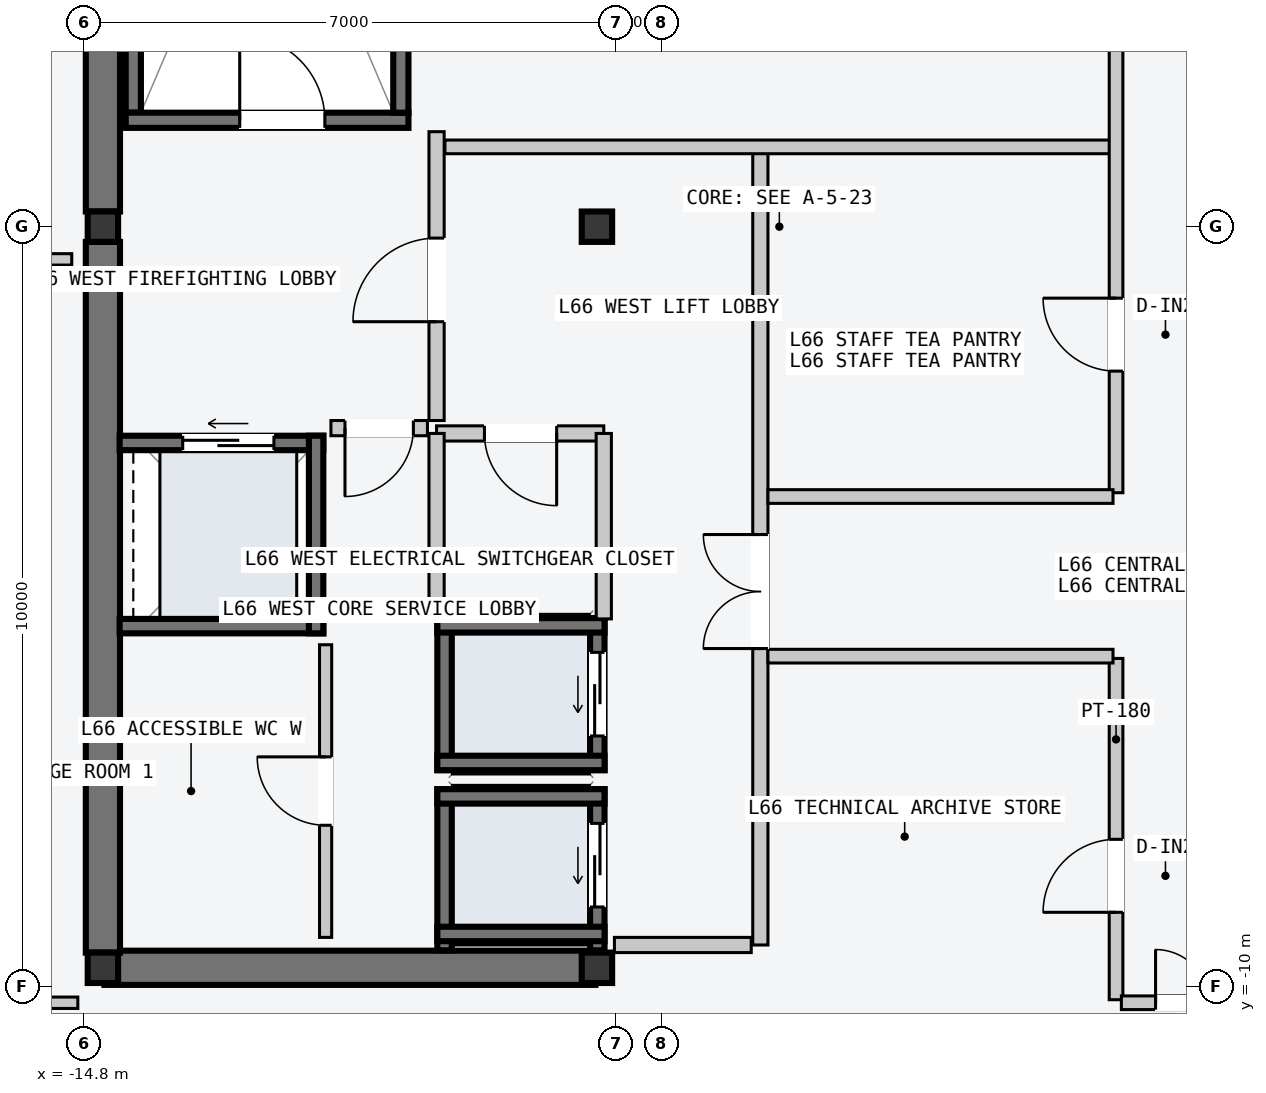
"""IFC4 building model, lengths in metres.
Left out: names, types, materials, properties, quantities, classifications, styles, units other than length and angle.
Written with IfcOpenShell. Run it as: python <this file> out.ifc"""

import sys

from ifc_helpers import new_model, si_unit, direction, frame, frame_2d, origin, origin_2d, place, context, subcontext, project, spatial, rectangle, i_section, extrude, element, fill, save


model = new_model("IFC4")
c1 = context("Model", 3, precision=1e-05, world=origin(), true_north=direction((0.0, 1.0)))
c2 = subcontext(c1, "Body", "Model", "MODEL_VIEW")
j1 = project(units=[si_unit("LENGTHUNIT", "METRE"), si_unit("PLANEANGLEUNIT", "RADIAN")], contexts=[c1])
p1 = place(None, origin())
s1 = spatial("IfcSite", under=j1, at=p1, CompositionType="ELEMENT")
p2 = place(p1, origin())
s2 = spatial("IfcBuilding", under=s1, at=p2, CompositionType="ELEMENT")
p3 = place(p2, frame((0.0, 0.0, 250.8)))
s3 = spatial("IfcBuildingStorey", under=s2, at=p3, CompositionType="ELEMENT", Elevation=250.8)
p4 = place(p3, frame((-14.53, -9.75, -0.2), z_axis=(0.0, 0.0, 1.0), x_axis=(1.0, 0.0, 0.0)))
e1 = element("IfcWall", 1, at=p4, inside=s3, PredefinedType="SHEAR", context=c2, shape_type="SweptSolid", body=[
    extrude(rectangle(XDim=6.46, YDim=0.45, at=frame_2d((3.23, 0.0))), origin(), (0.0, 0.0, 1.0), 3.6),
])
for number, where, z_axis, x_axis in (
    (2, (-14.55, -9.55, -0.2), (0.0, 0.0, 1.0), (0.0, 1.0, 0.0)),
    (3, (-14.55, 0.2, -0.2), (0.0, 0.0, 1.0), (0.0, 1.0, 0.0)),
):
    element("IfcWall", number, at=place(p3, frame(where, z_axis=z_axis, x_axis=x_axis)), inside=s3, PredefinedType="SHEAR", context=c2, shape_type="SweptSolid", body=[
        extrude(rectangle(XDim=9.35, YDim=0.45, at=frame_2d((4.675, 0.0))), origin(), (0.0, 0.0, 1.0), 3.6),
    ])
p5 = place(p3, frame((-14.15, 1.5, -0.2), z_axis=(0.0, 0.0, 1.0), x_axis=(0.0, 1.0, 0.0)))
e4 = element("IfcWall", 4, at=p5, inside=s3, PredefinedType="SOLIDWALL", context=c2, shape_type="SweptSolid", body=[
    extrude(rectangle(XDim=7.8, YDim=0.2, at=frame_2d((3.9, 0.0))), origin(), (0.0, 0.0, 1.0), 3.6),
])
p6 = place(p3, frame((-14.25, 1.4, -0.2), z_axis=(0.0, 0.0, 1.0), x_axis=(1.0, 0.0, 0.0)))
e5 = element("IfcWall", 5, at=p6, inside=s3, PredefinedType="SOLIDWALL", context=c2, shape_type="SweptSolid", body=[
    extrude(rectangle(XDim=3.72, YDim=0.2, at=frame_2d((1.86, 0.0))), origin(), (0.0, 0.0, 1.0), 3.6),
])
p7 = place(p6, frame((1.5, 0.0, 0.2)))
e6 = element("IfcOpeningElement", 6, at=p7, cuts=e5, PredefinedType="OPENING", context=c2, shape_type="SweptSolid", body=[
    extrude(rectangle(XDim=1.12, YDim=2.18, at=frame_2d((0.56, 1.09))), frame((0.0, 0.11, 0.0), z_axis=(0.0, -1.0, 0.0), x_axis=(1.0, 0.0, 0.0)), (0.0, 0.0, 1.0), 0.22),
])
p8 = place(p3, frame((-10.63, 1.5, -0.2), z_axis=(0.0, 0.0, 1.0), x_axis=(0.0, 1.0, 0.0)))
e7 = element("IfcWall", 7, at=p8, inside=s3, PredefinedType="SOLIDWALL", context=c2, shape_type="SweptSolid", body=[
    extrude(rectangle(XDim=7.8, YDim=0.2, at=frame_2d((3.9, 0.0))), origin(), (0.0, 0.0, 1.0), 3.6),
])
for number, where, z_axis, x_axis in (
    (8, (-14.55, -9.75, 0.0), (0.0, 0.0, 1.0), (1.0, 0.0, 0.0)),
    (9, (-14.55, 0.0, 0.0), (0.0, 0.0, 1.0), (1.0, 0.0, 0.0)),
    (10, (-8.05, -9.75, 0.0), (0.0, 0.0, 1.0), (1.0, 0.0, 0.0)),
    (11, (-8.05, 0.0, 0.0), (0.0, 0.0, 1.0), (1.0, 0.0, 0.0)),
):
    element("IfcColumn", number, at=place(p3, frame(where, z_axis=z_axis, x_axis=x_axis)), inside=s3, PredefinedType="COLUMN", context=c2, shape_type="SweptSolid", body=[
        extrude(i_section(OverallWidth=0.4, OverallDepth=0.4, WebThickness=0.013, FlangeThickness=0.021, at=origin_2d()), origin(), (0.0, 0.0, 1.0), 3.6),
    ])
p9 = place(p3, frame((-8.045, -9.52, -0.2), z_axis=(0.0, 0.0, 1.0), x_axis=(0.0, 1.0, 0.0)))
e12 = element("IfcWall", 12, at=p9, inside=s3, PredefinedType="SOLIDWALL", context=c2, shape_type="SweptSolid", body=[
    extrude(rectangle(XDim=2.12, YDim=0.19, at=frame_2d((1.06, 0.0))), origin(), (0.0, 0.0, 1.0), 3.6),
])
p10 = place(p9, frame((0.57, 0.0, 0.2)))
e13 = element("IfcOpeningElement", 13, at=p10, cuts=e12, PredefinedType="OPENING", context=c2, shape_type="SweptSolid", body=[
    extrude(rectangle(XDim=1.1, YDim=2.2, at=frame_2d((0.55, 1.1))), frame((0.0, 0.105, 0.0), z_axis=(0.0, -1.0, 0.0), x_axis=(1.0, 0.0, 0.0)), (0.0, 0.0, 1.0), 0.21),
])
p11 = place(p3, frame((-10.055, -9.52, -0.2), z_axis=(0.0, 0.0, 1.0), x_axis=(0.0, 1.0, 0.0)))
e14 = element("IfcWall", 14, at=p11, inside=s3, PredefinedType="SOLIDWALL", context=c2, shape_type="SweptSolid", body=[
    extrude(rectangle(XDim=2.12, YDim=0.19, at=frame_2d((1.06, 0.0))), origin(), (0.0, 0.0, 1.0), 3.6),
])
for number, where, z_axis, x_axis in (
    (15, (-10.15, -7.495, -0.2), (0.0, 0.0, 1.0), (1.0, 0.0, 0.0)),
    (16, (-10.15, -9.305, -0.2), (0.0, 0.0, 1.0), (1.0, 0.0, 0.0)),
):
    element("IfcWall", number, at=place(p3, frame(where, z_axis=z_axis, x_axis=x_axis)), inside=s3, PredefinedType="SOLIDWALL", context=c2, shape_type="SweptSolid", body=[
        extrude(rectangle(XDim=2.2, YDim=0.19, at=frame_2d((1.1, 0.0))), origin(), (0.0, 0.0, 1.0), 3.6),
    ])
p12 = place(p3, frame((-8.045, -7.15, -0.2), z_axis=(0.0, 0.0, 1.0), x_axis=(0.0, 1.0, 0.0)))
e17 = element("IfcWall", 17, at=p12, inside=s3, PredefinedType="SOLIDWALL", context=c2, shape_type="SweptSolid", body=[
    extrude(rectangle(XDim=2.0, YDim=0.19, at=frame_2d((1.0, 0.0))), origin(), (0.0, 0.0, 1.0), 3.6),
])
p13 = place(p12, frame((0.45, 0.0, 0.2)))
e18 = element("IfcOpeningElement", 18, at=p13, cuts=e17, PredefinedType="OPENING", context=c2, shape_type="SweptSolid", body=[
    extrude(rectangle(XDim=1.1, YDim=2.2, at=frame_2d((0.55, 1.1))), frame((0.0, 0.105, 0.0), z_axis=(0.0, -1.0, 0.0), x_axis=(1.0, 0.0, 0.0)), (0.0, 0.0, 1.0), 0.21),
])
p14 = place(p3, frame((-10.055, -7.15, -0.2), z_axis=(0.0, 0.0, 1.0), x_axis=(0.0, 1.0, 0.0)))
e19 = element("IfcWall", 19, at=p14, inside=s3, PredefinedType="SOLIDWALL", context=c2, shape_type="SweptSolid", body=[
    extrude(rectangle(XDim=2.0, YDim=0.19, at=frame_2d((1.0, 0.0))), origin(), (0.0, 0.0, 1.0), 3.6),
])
for number, where, z_axis, x_axis in (
    (20, (-10.15, -5.245, -0.2), (0.0, 0.0, 1.0), (1.0, 0.0, 0.0)),
    (21, (-10.15, -7.055, -0.2), (0.0, 0.0, 1.0), (1.0, 0.0, 0.0)),
):
    element("IfcWall", number, at=place(p3, frame(where, z_axis=z_axis, x_axis=x_axis)), inside=s3, PredefinedType="SOLIDWALL", context=c2, shape_type="SweptSolid", body=[
        extrude(rectangle(XDim=2.2, YDim=0.19, at=frame_2d((1.1, 0.0))), origin(), (0.0, 0.0, 1.0), 3.6),
    ])
p15 = place(p3, frame((-14.33, -2.845, -0.2), z_axis=(0.0, 0.0, 1.0), x_axis=(1.0, 0.0, 0.0)))
e22 = element("IfcWall", 22, at=p15, inside=s3, PredefinedType="SOLIDWALL", context=c2, shape_type="SweptSolid", body=[
    extrude(rectangle(XDim=2.68, YDim=0.19, at=frame_2d((1.34, 0.0))), origin(), (0.0, 0.0, 1.0), 3.6),
])
p16 = place(p15, frame((0.83, 0.0, 0.2)))
e23 = element("IfcOpeningElement", 23, at=p16, cuts=e22, PredefinedType="OPENING", context=c2, shape_type="SweptSolid", body=[
    extrude(rectangle(XDim=1.2, YDim=2.2, at=frame_2d((0.6, 1.1))), frame((0.0, 0.105, 0.0), z_axis=(0.0, -1.0, 0.0), x_axis=(1.0, 0.0, 0.0)), (0.0, 0.0, 1.0), 0.21),
])
p17 = place(p3, frame((-14.33, -5.255, -0.2), z_axis=(0.0, 0.0, 1.0), x_axis=(1.0, 0.0, 0.0)))
e24 = element("IfcWall", 24, at=p17, inside=s3, PredefinedType="SOLIDWALL", context=c2, shape_type="SweptSolid", body=[
    extrude(rectangle(XDim=2.68, YDim=0.19, at=frame_2d((1.34, 0.0))), origin(), (0.0, 0.0, 1.0), 3.6),
])
p18 = place(p3, frame((-11.745, -5.35, -0.2), z_axis=(0.0, 0.0, 1.0), x_axis=(0.0, 1.0, 0.0)))
e25 = element("IfcWall", 25, at=p18, inside=s3, PredefinedType="SOLIDWALL", context=c2, shape_type="SweptSolid", body=[
    extrude(rectangle(XDim=2.6, YDim=0.19, at=frame_2d((1.3, 0.0))), origin(), (0.0, 0.0, 1.0), 3.6),
])
p19 = place(p3, frame((-5.9, -9.45, 0.0), z_axis=(0.0, 0.0, 1.0), x_axis=(0.0, 1.0, 0.0)))
e26 = element("IfcWall", 26, at=p19, inside=s3, PredefinedType="PARTITIONING", context=c2, shape_type="SweptSolid", body=[
    extrude(rectangle(XDim=10.5, YDim=0.2, at=frame_2d((5.25, 0.0))), origin(), (0.0, 0.0, 1.0), 3.4),
])
p20 = place(p19, frame((3.9, 0.0, 0.0)))
e27 = element("IfcOpeningElement", 27, at=p20, cuts=e26, PredefinedType="OPENING", context=c2, shape_type="SweptSolid", body=[
    extrude(rectangle(XDim=1.5, YDim=2.2, at=frame_2d((0.75, 1.1))), frame((0.0, 0.11, 0.0), z_axis=(0.0, -1.0, 0.0), x_axis=(1.0, 0.0, 0.0)), (0.0, 0.0, 1.0), 0.22),
])
p21 = place(p3, frame((-6.02, -9.45, 0.0), z_axis=(0.0, 0.0, 1.0), x_axis=(-1.0, 0.0, 0.0)))
e28 = element("IfcWall", 28, at=p21, inside=s3, PredefinedType="PARTITIONING", context=c2, shape_type="SweptSolid", body=[
    extrude(rectangle(XDim=1.8, YDim=0.2, at=frame_2d((0.9, 0.0))), origin(), (0.0, 0.0, 1.0), 3.4),
])
p22 = place(p3, frame((-10.16, -2.55, 0.0), z_axis=(0.0, 0.0, 1.0), x_axis=(0.0, 1.0, 0.0)))
e29 = element("IfcWall", 29, at=p22, inside=s3, PredefinedType="PARTITIONING", context=c2, shape_type="SweptSolid", body=[
    extrude(rectangle(XDim=3.8, YDim=0.2, at=frame_2d((1.9, 0.0))), origin(), (0.0, 0.0, 1.0), 3.4),
])
p23 = place(p22, frame((1.3, 0.0, 0.0)))
e30 = element("IfcOpeningElement", 30, at=p23, cuts=e29, PredefinedType="OPENING", context=c2, shape_type="SweptSolid", body=[
    extrude(rectangle(XDim=1.1, YDim=2.15, at=frame_2d((0.55, 1.075))), frame((0.0, 0.11, 0.0), z_axis=(0.0, -1.0, 0.0), x_axis=(1.0, 0.0, 0.0)), (0.0, 0.0, 1.0), 0.22),
])
p24 = place(p3, frame((-10.28, -2.65, 0.0), z_axis=(0.0, 0.0, 1.0), x_axis=(-1.0, 0.0, 0.0)))
e31 = element("IfcWall", 31, at=p24, inside=s3, PredefinedType="PARTITIONING", context=c2, shape_type="SweptSolid", body=[
    extrude(rectangle(XDim=1.27, YDim=0.2, at=frame_2d((0.635, 0.0))), origin(), (0.0, 0.0, 1.0), 3.4),
])
p25 = place(p24, frame((0.185, 0.0, 0.0)))
e32 = element("IfcOpeningElement", 32, at=p25, cuts=e31, PredefinedType="OPENING", context=c2, shape_type="SweptSolid", body=[
    extrude(rectangle(XDim=0.9, YDim=2.15, at=frame_2d((0.45, 1.075))), frame((0.0, 0.11, 0.0), z_axis=(0.0, -1.0, 0.0), x_axis=(1.0, 0.0, 0.0)), (0.0, 0.0, 1.0), 0.22),
])
p26 = place(p3, frame((-7.96, -2.72, 0.0), z_axis=(0.0, 0.0, 1.0), x_axis=(-1.0, 0.0, 0.0)))
e33 = element("IfcWall", 33, at=p26, inside=s3, PredefinedType="PARTITIONING", context=c2, shape_type="SweptSolid", body=[
    extrude(rectangle(XDim=2.2, YDim=0.2, at=frame_2d((1.1, 0.0))), origin(), (0.0, 0.0, 1.0), 3.4),
])
p27 = place(p26, frame((0.62, 0.0, 0.0)))
e34 = element("IfcOpeningElement", 34, at=p27, cuts=e33, PredefinedType="OPENING", context=c2, shape_type="SweptSolid", body=[
    extrude(rectangle(XDim=0.95, YDim=2.1, at=frame_2d((0.475, 1.05))), frame((0.0, 0.11, 0.0), z_axis=(0.0, -1.0, 0.0), x_axis=(1.0, 0.0, 0.0)), (0.0, 0.0, 1.0), 0.22),
])
for number, where, z_axis, x_axis in (
    (35, (-7.96, -5.16, 0.0), (0.0, 0.0, 1.0), (0.0, 1.0, 0.0)),
    (36, (-10.16, -5.16, 0.0), (0.0, 0.0, 1.0), (0.0, 1.0, 0.0)),
):
    element("IfcWall", number, at=place(p3, frame(where, z_axis=z_axis, x_axis=x_axis)), inside=s3, PredefinedType="PARTITIONING", context=c2, shape_type="SweptSolid", body=[
        extrude(rectangle(XDim=2.44, YDim=0.2, at=frame_2d((1.22, 0.0))), origin(), (0.0, 0.0, 1.0), 3.4),
    ])
p28 = place(p3, frame((-11.62, -9.35, 0.0), z_axis=(0.0, 0.0, 1.0), x_axis=(0.0, 1.0, 0.0)))
e37 = element("IfcWall", 37, at=p28, inside=s3, PredefinedType="PARTITIONING", context=c2, shape_type="SweptSolid", body=[
    extrude(rectangle(XDim=3.85, YDim=0.16, at=frame_2d((1.925, 0.0))), origin(), (0.0, 0.0, 1.0), 3.4),
])
p29 = place(p28, frame((1.475, 0.0, 0.0)))
e38 = element("IfcOpeningElement", 38, at=p29, cuts=e37, PredefinedType="OPENING", context=c2, shape_type="SweptSolid", body=[
    extrude(rectangle(XDim=0.9, YDim=2.15, at=frame_2d((0.45, 1.075))), frame((0.0, 0.09, 0.0), z_axis=(0.0, -1.0, 0.0), x_axis=(1.0, 0.0, 0.0)), (0.0, 0.0, 1.0), 0.18),
])
p30 = place(p3, frame((-10.05, 1.05, 0.0), z_axis=(0.0, 0.0, 1.0), x_axis=(1.0, 0.0, 0.0)))
e39 = element("IfcWall", 39, at=p30, inside=s3, PredefinedType="PARTITIONING", context=c2, shape_type="SweptSolid", body=[
    extrude(rectangle(XDim=8.79, YDim=0.18, at=frame_2d((4.395, 0.0))), origin(), (0.0, 0.0, 1.0), 3.4),
])
p31 = place(p3, frame((-1.22, -3.5, 0.0), z_axis=(0.0, 0.0, 1.0), x_axis=(0.0, 1.0, 0.0)))
e40 = element("IfcWall", 40, at=p31, inside=s3, PredefinedType="PARTITIONING", context=c2, shape_type="SweptSolid", body=[
    extrude(rectangle(XDim=13.67, YDim=0.18, at=frame_2d((6.835, 0.0))), origin(), (0.0, 0.0, 1.0), 3.4),
])
p32 = place(p31, frame((6.1, 0.0, 0.0)))
e41 = element("IfcOpeningElement", 41, at=p32, cuts=e40, PredefinedType="OPENING", context=c2, shape_type="SweptSolid", body=[
    extrude(rectangle(XDim=1.24, YDim=2.24, at=frame_2d((0.62, 1.12))), frame((0.0, 0.1, 0.0), z_axis=(0.0, -1.0, 0.0), x_axis=(1.0, 0.0, 0.0)), (0.0, 0.0, 1.0), 0.2),
])
p33 = place(p31, frame((1.6, 0.0, 0.0)))
e42 = element("IfcOpeningElement", 42, at=p33, cuts=e40, PredefinedType="OPENING", context=c2, shape_type="SweptSolid", body=[
    extrude(rectangle(XDim=0.96, YDim=2.18, at=frame_2d((0.48, 1.09))), frame((0.0, 0.1, 0.0), z_axis=(0.0, -1.0, 0.0), x_axis=(1.0, 0.0, 0.0)), (0.0, 0.0, 1.0), 0.2),
])
p34 = place(p3, frame((-5.8, -3.55, 0.0), z_axis=(0.0, 0.0, 1.0), x_axis=(1.0, 0.0, 0.0)))
e43 = element("IfcWall", 43, at=p34, inside=s3, PredefinedType="PARTITIONING", context=c2, shape_type="SweptSolid", body=[
    extrude(rectangle(XDim=4.54, YDim=0.18, at=frame_2d((2.27, 0.0))), origin(), (0.0, 0.0, 1.0), 3.4),
])
p35 = place(p3, frame((-1.22, -10.17, 0.0), z_axis=(0.0, 0.0, 1.0), x_axis=(0.0, 1.0, 0.0)))
e44 = element("IfcWall", 44, at=p35, inside=s3, PredefinedType="PARTITIONING", context=c2, shape_type="SweptSolid", body=[
    extrude(rectangle(XDim=4.49, YDim=0.18, at=frame_2d((2.245, 0.0))), origin(), (0.0, 0.0, 1.0), 3.4),
])
p36 = place(p35, frame((1.15, 0.0, 0.0)))
e45 = element("IfcOpeningElement", 45, at=p36, cuts=e44, PredefinedType="OPENING", context=c2, shape_type="SweptSolid", body=[
    extrude(rectangle(XDim=0.96, YDim=2.18, at=frame_2d((0.48, 1.09))), frame((0.0, 0.1, 0.0), z_axis=(0.0, -1.0, 0.0), x_axis=(1.0, 0.0, 0.0)), (0.0, 0.0, 1.0), 0.2),
])
p37 = place(p3, frame((-5.8, -5.65, 0.0), z_axis=(0.0, 0.0, 1.0), x_axis=(1.0, 0.0, 0.0)))
e46 = element("IfcWall", 46, at=p37, inside=s3, PredefinedType="PARTITIONING", context=c2, shape_type="SweptSolid", body=[
    extrude(rectangle(XDim=4.54, YDim=0.18, at=frame_2d((2.27, 0.0))), origin(), (0.0, 0.0, 1.0), 3.4),
])
p38 = place(p3, frame((-1.15, -10.21, 0.0), z_axis=(0.0, 0.0, 1.0), x_axis=(1.0, 0.0, 0.0)))
e47 = element("IfcWall", 47, at=p38, inside=s3, PredefinedType="PARTITIONING", context=c2, shape_type="SweptSolid", body=[
    extrude(rectangle(XDim=2.3, YDim=0.18, at=frame_2d((1.15, 0.0))), origin(), (0.0, 0.0, 1.0), 3.4),
])
p39 = place(p38, frame((0.45, 0.0, 0.0)))
e48 = element("IfcOpeningElement", 48, at=p39, cuts=e47, PredefinedType="OPENING", context=c2, shape_type="SweptSolid", body=[
    extrude(rectangle(XDim=1.4, YDim=2.2, at=frame_2d((0.7, 1.1))), frame((0.0, 0.1, 0.0), z_axis=(0.0, -1.0, 0.0), x_axis=(1.0, 0.0, 0.0)), (0.0, 0.0, 1.0), 0.2),
])
p40 = place(p3, frame((-17.55, -10.21, 0.0), z_axis=(0.0, 0.0, 1.0), x_axis=(1.0, 0.0, 0.0)))
e49 = element("IfcWall", 49, at=p40, inside=s3, PredefinedType="PARTITIONING", context=c2, shape_type="SweptSolid", body=[
    extrude(rectangle(XDim=2.67, YDim=0.15, at=frame_2d((1.335, 0.0))), origin(), (0.0, 0.0, 1.0), 3.4),
])
p41 = place(p40, frame((0.855, 0.0, 0.0)))
e50 = element("IfcOpeningElement", 50, at=p41, cuts=e49, PredefinedType="OPENING", context=c2, shape_type="SweptSolid", body=[
    extrude(rectangle(XDim=0.96, YDim=2.18, at=frame_2d((0.48, 1.09))), frame((0.0, 0.085, 0.0), z_axis=(0.0, -1.0, 0.0), x_axis=(1.0, 0.0, 0.0)), (0.0, 0.0, 1.0), 0.17),
])
p42 = place(p3, frame((-18.56, -0.43, 0.0), z_axis=(0.0, 0.0, 1.0), x_axis=(1.0, 0.0, 0.0)))
e51 = element("IfcWall", 51, at=p42, inside=s3, PredefinedType="PARTITIONING", context=c2, shape_type="SweptSolid", body=[
    extrude(rectangle(XDim=3.6, YDim=0.15, at=frame_2d((1.8, 0.0))), origin(), (0.0, 0.0, 1.0), 3.4),
])
p43 = place(p42, frame((0.9, 0.0, 0.0)))
e52 = element("IfcOpeningElement", 52, at=p43, cuts=e51, PredefinedType="OPENING", context=c2, shape_type="SweptSolid", body=[
    extrude(rectangle(XDim=0.96, YDim=2.18, at=frame_2d((0.48, 1.09))), frame((0.0, 0.085, 0.0), z_axis=(0.0, -1.0, 0.0), x_axis=(1.0, 0.0, 0.0)), (0.0, 0.0, 1.0), 0.17),
])
p44 = place(p7, origin())
e53 = element("IfcDoor", 53, at=p44, inside=s3, OperationType="SINGLE_SWING_LEFT", PredefinedType="DOOR", context=c2, shape_type="SweptSolid", body=[
    extrude(rectangle(XDim=1.12, YDim=2.18, at=frame_2d((0.56, 1.09))), frame((0.0, 0.025, 0.0), z_axis=(0.0, -1.0, 0.0), x_axis=(1.0, 0.0, 0.0)), (0.0, 0.0, 1.0), 0.05),
])
fill(e6, e53)
p45 = place(p10, origin())
e54 = element("IfcDoor", 54, at=p45, inside=s3, OperationType="SLIDING_TO_LEFT", PredefinedType="DOOR", context=c2, shape_type="SweptSolid", body=[
    extrude(rectangle(XDim=1.1, YDim=2.2, at=frame_2d((0.55, 1.1))), frame((0.0, 0.025, 0.0), z_axis=(0.0, -1.0, 0.0), x_axis=(1.0, 0.0, 0.0)), (0.0, 0.0, 1.0), 0.05),
])
fill(e13, e54)
p46 = place(p13, origin())
e55 = element("IfcDoor", 55, at=p46, inside=s3, OperationType="SLIDING_TO_LEFT", PredefinedType="DOOR", context=c2, shape_type="SweptSolid", body=[
    extrude(rectangle(XDim=1.1, YDim=2.2, at=frame_2d((0.55, 1.1))), frame((0.0, 0.025, 0.0), z_axis=(0.0, -1.0, 0.0), x_axis=(1.0, 0.0, 0.0)), (0.0, 0.0, 1.0), 0.05),
])
fill(e18, e55)
p47 = place(p16, origin())
e56 = element("IfcDoor", 56, at=p47, inside=s3, OperationType="SLIDING_TO_LEFT", PredefinedType="DOOR", context=c2, shape_type="SweptSolid", body=[
    extrude(rectangle(XDim=1.2, YDim=2.2, at=frame_2d((0.6, 1.1))), frame((0.0, 0.025, 0.0), z_axis=(0.0, -1.0, 0.0), x_axis=(1.0, 0.0, 0.0)), (0.0, 0.0, 1.0), 0.05),
])
fill(e23, e56)
p48 = place(p20, origin())
e57 = element("IfcDoor", 57, at=p48, inside=s3, OperationType="DOUBLE_DOOR_SINGLE_SWING", PredefinedType="DOOR", context=c2, shape_type="SweptSolid", body=[
    extrude(rectangle(XDim=1.5, YDim=2.2, at=frame_2d((0.75, 1.1))), frame((0.0, 0.025, 0.0), z_axis=(0.0, -1.0, 0.0), x_axis=(1.0, 0.0, 0.0)), (0.0, 0.0, 1.0), 0.05),
])
fill(e27, e57)
p49 = place(p23, origin())
e58 = element("IfcDoor", 58, at=p49, inside=s3, OperationType="SINGLE_SWING_LEFT", PredefinedType="DOOR", context=c2, shape_type="SweptSolid", body=[
    extrude(rectangle(XDim=1.1, YDim=2.15, at=frame_2d((0.55, 1.075))), frame((0.0, 0.025, 0.0), z_axis=(0.0, -1.0, 0.0), x_axis=(1.0, 0.0, 0.0)), (0.0, 0.0, 1.0), 0.05),
])
fill(e30, e58)
p50 = place(p25, origin())
e59 = element("IfcDoor", 59, at=p50, inside=s3, OperationType="SINGLE_SWING_RIGHT", PredefinedType="DOOR", context=c2, shape_type="SweptSolid", body=[
    extrude(rectangle(XDim=0.9, YDim=2.15, at=frame_2d((0.45, 1.075))), frame((0.0, 0.025, 0.0), z_axis=(0.0, -1.0, 0.0), x_axis=(1.0, 0.0, 0.0)), (0.0, 0.0, 1.0), 0.05),
])
fill(e32, e59)
p51 = place(p27, origin())
e60 = element("IfcDoor", 60, at=p51, inside=s3, OperationType="SINGLE_SWING_LEFT", PredefinedType="DOOR", context=c2, shape_type="SweptSolid", body=[
    extrude(rectangle(XDim=0.95, YDim=2.1, at=frame_2d((0.475, 1.05))), frame((0.0, 0.025, 0.0), z_axis=(0.0, -1.0, 0.0), x_axis=(1.0, 0.0, 0.0)), (0.0, 0.0, 1.0), 0.05),
])
fill(e34, e60)
p52 = place(p29, origin())
e61 = element("IfcDoor", 61, at=p52, inside=s3, OperationType="SINGLE_SWING_RIGHT", PredefinedType="DOOR", context=c2, shape_type="SweptSolid", body=[
    extrude(rectangle(XDim=0.9, YDim=2.15, at=frame_2d((0.45, 1.075))), frame((0.0, 0.025, 0.0), z_axis=(0.0, -1.0, 0.0), x_axis=(1.0, 0.0, 0.0)), (0.0, 0.0, 1.0), 0.05),
])
fill(e38, e61)
p53 = place(p33, origin())
e62 = element("IfcDoor", 62, at=p53, inside=s3, OperationType="SINGLE_SWING_RIGHT", PredefinedType="DOOR", context=c2, shape_type="SweptSolid", body=[
    extrude(rectangle(XDim=0.96, YDim=2.18, at=frame_2d((0.48, 1.09))), frame((0.0, 0.025, 0.0), z_axis=(0.0, -1.0, 0.0), x_axis=(1.0, 0.0, 0.0)), (0.0, 0.0, 1.0), 0.05),
])
fill(e42, e62)
p54 = place(p36, origin())
e63 = element("IfcDoor", 63, at=p54, inside=s3, OperationType="SINGLE_SWING_LEFT", PredefinedType="DOOR", context=c2, shape_type="SweptSolid", body=[
    extrude(rectangle(XDim=0.96, YDim=2.18, at=frame_2d((0.48, 1.09))), frame((0.0, 0.025, 0.0), z_axis=(0.0, -1.0, 0.0), x_axis=(1.0, 0.0, 0.0)), (0.0, 0.0, 1.0), 0.05),
])
fill(e45, e63)
p55 = place(p39, origin())
e64 = element("IfcDoor", 64, at=p55, inside=s3, OperationType="DOUBLE_DOOR_SINGLE_SWING", PredefinedType="DOOR", context=c2, shape_type="SweptSolid", body=[
    extrude(rectangle(XDim=1.4, YDim=2.2, at=frame_2d((0.7, 1.1))), frame((0.0, 0.025, 0.0), z_axis=(0.0, -1.0, 0.0), x_axis=(1.0, 0.0, 0.0)), (0.0, 0.0, 1.0), 0.05),
])
fill(e48, e64)
save(model, sys.argv[1])
